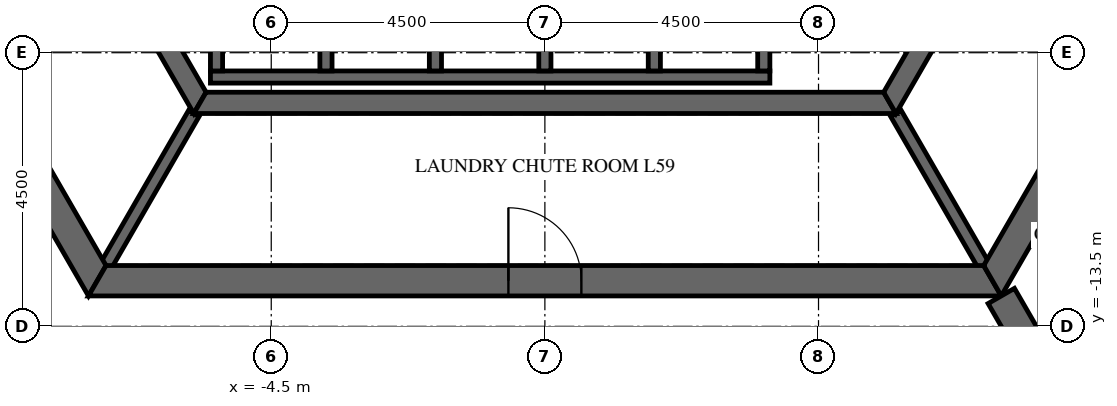
"""IFC4 building model, lengths in metres.
Left out: names, types, materials, properties, quantities, classifications, styles, units other than length and angle.
Written with IfcOpenShell. Run it as: python <this file> out.ifc"""

import sys

from ifc_helpers import new_model, si_unit, direction, frame, frame_2d, origin, place, context, subcontext, project, spatial, polyline, rectangle, outline, extrude, element, fill, save


model = new_model("IFC4")
c1 = context("Model", 3, precision=1e-05, world=origin(), true_north=direction((0.0, 1.0)))
c2 = subcontext(c1, "Body", "Model", "MODEL_VIEW")
j1 = project(units=[si_unit("LENGTHUNIT", "METRE"), si_unit("PLANEANGLEUNIT", "RADIAN")], contexts=[c1])
p1 = place(None, origin())
s1 = spatial("IfcSite", under=j1, at=p1, CompositionType="ELEMENT")
p2 = place(p1, origin())
s2 = spatial("IfcBuilding", under=s1, at=p2, CompositionType="ELEMENT")
p3 = place(p2, frame((0.0, 0.0, 246.3)))
s3 = spatial("IfcBuildingStorey", under=s2, at=p3, CompositionType="ELEMENT", Elevation=246.3)
p4 = place(p3, frame((-14.722, 0.0, -0.15), z_axis=(0.0, 0.0, 1.0), x_axis=(0.50000571537, -0.866022103989, 0.0)))
e1 = element("IfcWall", 1, at=p4, inside=s3, PredefinedType="SHEAR", context=c2, shape_type="SweptSolid", body=[
    extrude(outline(polyline([(-0.144, -0.25), (14.867, -0.25), (14.578, 0.25), (0.144, 0.25), (-0.144, -0.25)])), origin(), (0.0, 0.0, 1.0), 3.75),
])
p5 = place(p4, frame((6.432, 0.0, 0.15)))
e2 = element("IfcOpeningElement", 2, at=p5, cuts=e1, PredefinedType="OPENING", context=c2, shape_type="SweptSolid", body=[
    extrude(rectangle(XDim=1.8, YDim=2.4, at=frame_2d((0.9, 1.2))), frame((0.0, 0.26, 0.0), z_axis=(0.0, -1.0, 0.0), x_axis=(1.0, 0.0, 0.0)), (0.0, 0.0, 1.0), 0.52),
])
p6 = place(p3, frame((-7.361, -12.75, -0.15), z_axis=(0.0, 0.0, 1.0), x_axis=(1.0, 0.0, 0.0)))
e3 = element("IfcWall", 3, at=p6, inside=s3, PredefinedType="SHEAR", context=c2, shape_type="SweptSolid", body=[
    extrude(outline(polyline([(-0.144, -0.25), (14.866, -0.25), (14.578, 0.25), (0.144, 0.25), (-0.144, -0.25)])), origin(), (0.0, 0.0, 1.0), 3.75),
])
p7 = place(p6, frame((6.761, 0.0, 0.15)))
e4 = element("IfcOpeningElement", 4, at=p7, cuts=e3, PredefinedType="OPENING", context=c2, shape_type="SweptSolid", body=[
    extrude(rectangle(XDim=1.2, YDim=2.4, at=frame_2d((0.6, 1.2))), frame((0.0, 0.26, 0.0), z_axis=(0.0, -1.0, 0.0), x_axis=(1.0, 0.0, 0.0)), (0.0, 0.0, 1.0), 0.52),
])
p8 = place(p3, frame((7.361, -12.75, -0.15), z_axis=(0.0, 0.0, 1.0), x_axis=(0.50000571537, 0.866022103989, 0.0)))
e5 = element("IfcWall", 5, at=p8, inside=s3, PredefinedType="SHEAR", context=c2, shape_type="SweptSolid", body=[
    extrude(outline(polyline([(-0.144, -0.25), (14.867, -0.25), (14.578, 0.25), (0.144, 0.25), (-0.144, -0.25)])), origin(), (0.0, 0.0, 1.0), 3.75),
])
p9 = place(p8, frame((6.49, 0.0, 0.15)))
e6 = element("IfcOpeningElement", 6, at=p9, cuts=e5, PredefinedType="OPENING", context=c2, shape_type="SweptSolid", body=[
    extrude(rectangle(XDim=1.8, YDim=2.4, at=frame_2d((0.9, 1.2))), frame((0.0, 0.26, 0.0), z_axis=(0.0, -1.0, 0.0), x_axis=(1.0, 0.0, 0.0)), (0.0, 0.0, 1.0), 0.52),
])
p10 = place(p3, frame((7.506, -13.0, -0.15), z_axis=(0.0, 0.0, 1.0), x_axis=(0.499988271576, -0.866032175087, 0.0)))
e7 = element("IfcWall", 7, at=p10, inside=s3, PredefinedType="SHEAR", context=c2, shape_type="SweptSolid", body=[
    extrude(rectangle(XDim=15.424, YDim=0.5, at=frame_2d((7.712, 0.0))), origin(), (0.0, 0.0, 1.0), 3.75),
])
p11 = place(p10, frame((6.812, 0.0, 0.15)))
e8 = element("IfcOpeningElement", 8, at=p11, cuts=e7, PredefinedType="OPENING", context=c2, shape_type="SweptSolid", body=[
    extrude(rectangle(XDim=1.8, YDim=2.4, at=frame_2d((0.9, 1.2))), frame((0.0, 0.26, 0.0), z_axis=(0.0, -1.0, 0.0), x_axis=(1.0, 0.0, 0.0)), (0.0, 0.0, 1.0), 0.52),
])
p12 = place(p3, frame((-11.345, 0.0, -0.15), z_axis=(0.0, 0.0, 1.0), x_axis=(0.499995046907, -0.866028263435, 0.0)))
e9 = element("IfcWall", 9, at=p12, inside=s3, PredefinedType="SHEAR", context=c2, shape_type="SweptSolid", body=[
    extrude(outline(polyline([(-0.101, -0.175), (11.446, -0.175), (11.244, 0.175), (0.101, 0.175), (-0.101, -0.175)])), origin(), (0.0, 0.0, 1.0), 3.75),
])
p13 = place(p12, frame((4.744, 0.0, 0.15)))
e10 = element("IfcOpeningElement", 10, at=p13, cuts=e9, PredefinedType="OPENING", context=c2, shape_type="SweptSolid", body=[
    extrude(rectangle(XDim=1.8, YDim=2.4, at=frame_2d((0.9, 1.2))), frame((0.0, 0.185, 0.0), z_axis=(0.0, -1.0, 0.0), x_axis=(1.0, 0.0, 0.0)), (0.0, 0.0, 1.0), 0.37),
])
p14 = place(p3, frame((-5.673, -9.825, -0.15), z_axis=(0.0, 0.0, 1.0), x_axis=(1.0, 0.0, 0.0)))
e11 = element("IfcWall", 11, at=p14, inside=s3, PredefinedType="SHEAR", context=c2, shape_type="SweptSolid", body=[
    extrude(outline(polyline([(-0.101, -0.175), (11.446, -0.175), (11.244, 0.175), (0.101, 0.175), (-0.101, -0.175)])), origin(), (0.0, 0.0, 1.0), 3.75),
])
p15 = place(p3, frame((5.673, -9.825, -0.15), z_axis=(0.0, 0.0, 1.0), x_axis=(0.499995046907, 0.866028263435, 0.0)))
e12 = element("IfcWall", 12, at=p15, inside=s3, PredefinedType="SHEAR", context=c2, shape_type="SweptSolid", body=[
    extrude(outline(polyline([(-0.101, -0.175), (11.446, -0.175), (11.244, 0.175), (0.101, 0.175), (-0.101, -0.175)])), origin(), (0.0, 0.0, 1.0), 3.75),
])
p16 = place(p15, frame((4.801, 0.0, 0.15)))
e13 = element("IfcOpeningElement", 13, at=p16, cuts=e12, PredefinedType="OPENING", context=c2, shape_type="SweptSolid", body=[
    extrude(rectangle(XDim=1.8, YDim=2.4, at=frame_2d((0.9, 1.2))), frame((0.0, 0.185, 0.0), z_axis=(0.0, -1.0, 0.0), x_axis=(1.0, 0.0, 0.0)), (0.0, 0.0, 1.0), 0.37),
])
p17 = place(p3, frame((-5.5, -9.4, -0.25), z_axis=(0.0, 0.0, 1.0), x_axis=(1.0, 0.0, 0.0)))
e14 = element("IfcWall", 14, at=p17, inside=s3, PredefinedType="SHEAR", context=c2, shape_type="SweptSolid", body=[
    extrude(rectangle(XDim=9.2, YDim=0.2, at=frame_2d((4.6, 0.0))), origin(), (0.0, 0.0, 1.0), 3.9),
])
for number, where, z_axis, x_axis in (
    (15, (-5.4, -9.3, -0.25), (0.0, 0.0, 1.0), (0.0, 1.0, 0.0)),
    (16, (-3.6, -9.3, -0.25), (0.0, 0.0, 1.0), (0.0, 1.0, 0.0)),
    (17, (-1.8, -9.3, -0.25), (0.0, 0.0, 1.0), (0.0, 1.0, 0.0)),
    (18, (0.0, -9.3, -0.25), (0.0, 0.0, 1.0), (0.0, 1.0, 0.0)),
    (19, (1.8, -9.3, -0.25), (0.0, 0.0, 1.0), (0.0, 1.0, 0.0)),
    (20, (3.6, -9.3, -0.25), (0.0, 0.0, 1.0), (0.0, 1.0, 0.0)),
):
    element("IfcWall", number, at=place(p3, frame(where, z_axis=z_axis, x_axis=x_axis)), inside=s3, PredefinedType="SHEAR", context=c2, shape_type="SweptSolid", body=[
        extrude(rectangle(XDim=2.9, YDim=0.2, at=frame_2d((1.45, 0.0))), origin(), (0.0, 0.0, 1.0), 3.9),
    ])
for number, where, z_axis, x_axis in (
    (21, (-5.773, -10.0, -0.15), (0.0, 0.0, 1.0), (-0.5, -0.866, 0.0)),
    (22, (5.773, -10.0, -0.15), (0.0, 0.0, 1.0), (0.5, -0.866, 0.0)),
):
    element("IfcWall", number, at=place(p3, frame(where, z_axis=z_axis, x_axis=x_axis)), inside=s3, PredefinedType="SHEAR", context=c2, shape_type="SweptSolid", body=[
        extrude(rectangle(XDim=2.887, YDim=0.2, at=frame_2d((1.443, 0.0))), origin(), (0.0, 0.0, 1.0), 3.75),
    ])
p18 = place(p7, origin())
e23 = element("IfcDoor", 23, at=p18, inside=s3, OperationType="SINGLE_SWING_LEFT", PredefinedType="DOOR", context=c2, shape_type="SweptSolid", body=[
    extrude(rectangle(XDim=1.2, YDim=2.4, at=frame_2d((0.6, 1.2))), frame((0.0, 0.025, 0.0), z_axis=(0.0, -1.0, 0.0), x_axis=(1.0, 0.0, 0.0)), (0.0, 0.0, 1.0), 0.05),
])
fill(e4, e23)
save(model, sys.argv[1])
